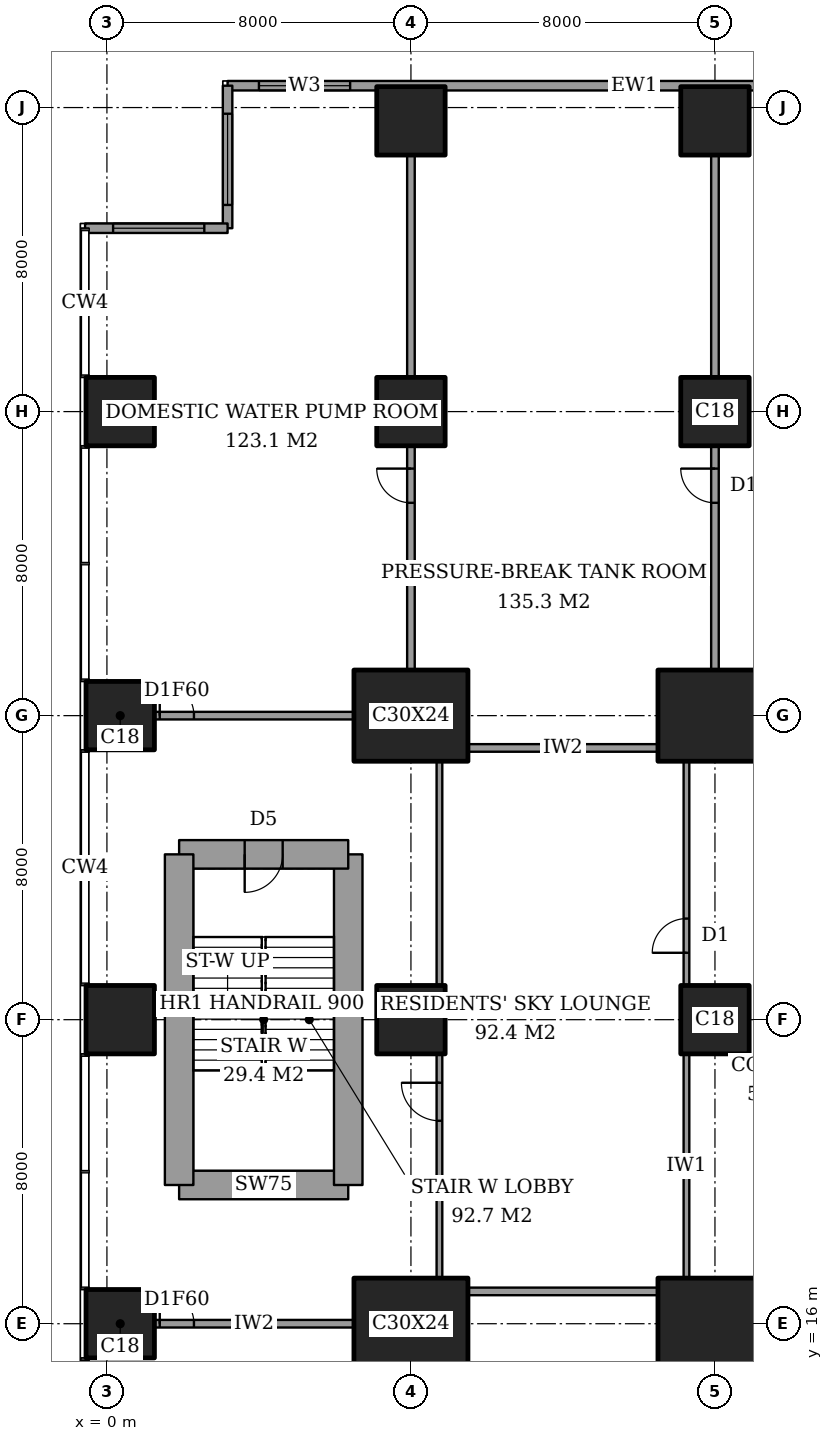
"""IFC4 building model, lengths in metres.
Left out: names, types, materials, properties, quantities, classifications, styles, units other than length and angle.
Written with IfcOpenShell. Run it as: python <this file> out.ifc"""

import sys

from ifc_helpers import new_model, si_unit, direction, frame, frame_2d, origin, origin_2d, place, context, subcontext, project, spatial, rectangle, extrude, element, fill, save


model = new_model("IFC4")
c1 = context("Model", 3, precision=1e-05, world=origin(), true_north=direction((0.0, 1.0)))
c2 = subcontext(c1, "Body", "Model", "MODEL_VIEW")
j1 = project(units=[si_unit("LENGTHUNIT", "METRE"), si_unit("PLANEANGLEUNIT", "RADIAN")], contexts=[c1])
p1 = place(None, origin())
s1 = spatial("IfcSite", under=j1, at=p1, CompositionType="ELEMENT")
p2 = place(p1, origin())
s2 = spatial("IfcBuilding", under=s1, at=p2, CompositionType="ELEMENT")
p3 = place(p2, frame((0.0, 0.0, 177.2)))
s3 = spatial("IfcBuildingStorey", under=s2, at=p3, CompositionType="ELEMENT", Elevation=177.2)
for number, where, z_axis, x_axis in (
    (1, (0.35, 16.0, 0.0), (0.0, 0.0, 1.0), (1.0, 0.0, 0.0)),
    (2, (0.35, 24.0, 0.0), (0.0, 0.0, 1.0), (1.0, 0.0, 0.0)),
    (3, (0.35, 32.0, 0.0), (0.0, 0.0, 1.0), (1.0, 0.0, 0.0)),
    (4, (0.35, 40.0, 0.0), (0.0, 0.0, 1.0), (1.0, 0.0, 0.0)),
):
    element("IfcColumn", number, at=place(p3, frame(where, z_axis=z_axis, x_axis=x_axis)), inside=s3, PredefinedType="COLUMN", context=c2, shape_type="SweptSolid", body=[
        extrude(rectangle(XDim=1.8, YDim=1.8, at=origin_2d()), origin(), (0.0, 0.0, 1.0), 5.0),
    ])
p4 = place(p3, frame((8.0, 16.0, 0.0), z_axis=(0.0, 0.0, 1.0), x_axis=(1.0, 0.0, 0.0)))
e5 = element("IfcColumn", 5, at=p4, inside=s3, PredefinedType="COLUMN", context=c2, shape_type="SweptSolid", body=[
    extrude(rectangle(XDim=3.0, YDim=2.4, at=origin_2d()), origin(), (0.0, 0.0, 1.0), 5.0),
])
p5 = place(p3, frame((8.0, 24.0, 0.0), z_axis=(0.0, 0.0, 1.0), x_axis=(1.0, 0.0, 0.0)))
e6 = element("IfcColumn", 6, at=p5, inside=s3, PredefinedType="COLUMN", context=c2, shape_type="SweptSolid", body=[
    extrude(rectangle(XDim=1.8, YDim=1.8, at=origin_2d()), origin(), (0.0, 0.0, 1.0), 5.0),
])
p6 = place(p3, frame((8.0, 32.0, 0.0), z_axis=(0.0, 0.0, 1.0), x_axis=(1.0, 0.0, 0.0)))
e7 = element("IfcColumn", 7, at=p6, inside=s3, PredefinedType="COLUMN", context=c2, shape_type="SweptSolid", body=[
    extrude(rectangle(XDim=3.0, YDim=2.4, at=origin_2d()), origin(), (0.0, 0.0, 1.0), 5.0),
])
for number, where, z_axis, x_axis in (
    (8, (8.0, 40.0, 0.0), (0.0, 0.0, 1.0), (1.0, 0.0, 0.0)),
    (9, (8.0, 47.65, 0.0), (0.0, 0.0, 1.0), (1.0, 0.0, 0.0)),
):
    element("IfcColumn", number, at=place(p3, frame(where, z_axis=z_axis, x_axis=x_axis)), inside=s3, PredefinedType="COLUMN", context=c2, shape_type="SweptSolid", body=[
        extrude(rectangle(XDim=1.8, YDim=1.8, at=origin_2d()), origin(), (0.0, 0.0, 1.0), 5.0),
    ])
p7 = place(p3, frame((16.0, 16.0, 0.0), z_axis=(0.0, 0.0, 1.0), x_axis=(1.0, 0.0, 0.0)))
e10 = element("IfcColumn", 10, at=p7, inside=s3, PredefinedType="COLUMN", context=c2, shape_type="SweptSolid", body=[
    extrude(rectangle(XDim=3.0, YDim=2.4, at=origin_2d()), origin(), (0.0, 0.0, 1.0), 5.0),
])
p8 = place(p3, frame((16.0, 24.0, 0.0), z_axis=(0.0, 0.0, 1.0), x_axis=(1.0, 0.0, 0.0)))
e11 = element("IfcColumn", 11, at=p8, inside=s3, PredefinedType="COLUMN", context=c2, shape_type="SweptSolid", body=[
    extrude(rectangle(XDim=1.8, YDim=1.8, at=origin_2d()), origin(), (0.0, 0.0, 1.0), 5.0),
])
p9 = place(p3, frame((16.0, 32.0, 0.0), z_axis=(0.0, 0.0, 1.0), x_axis=(1.0, 0.0, 0.0)))
e12 = element("IfcColumn", 12, at=p9, inside=s3, PredefinedType="COLUMN", context=c2, shape_type="SweptSolid", body=[
    extrude(rectangle(XDim=3.0, YDim=2.4, at=origin_2d()), origin(), (0.0, 0.0, 1.0), 5.0),
])
for number, where, z_axis, x_axis in (
    (13, (16.0, 40.0, 0.0), (0.0, 0.0, 1.0), (1.0, 0.0, 0.0)),
    (14, (16.0, 47.65, 0.0), (0.0, 0.0, 1.0), (1.0, 0.0, 0.0)),
):
    element("IfcColumn", number, at=place(p3, frame(where, z_axis=z_axis, x_axis=x_axis)), inside=s3, PredefinedType="COLUMN", context=c2, shape_type="SweptSolid", body=[
        extrude(rectangle(XDim=1.8, YDim=1.8, at=origin_2d()), origin(), (0.0, 0.0, 1.0), 5.0),
    ])
p10 = place(p3, frame((1.9, 19.65, 0.0), z_axis=(0.0, 0.0, 1.0), x_axis=(1.0, 0.0, 0.0)))
e15 = element("IfcWall", 15, at=p10, inside=s3, PredefinedType="SHEAR", context=c2, shape_type="SweptSolid", body=[
    extrude(rectangle(XDim=4.45, YDim=0.75, at=frame_2d((2.225, 0.0))), origin(), (0.0, 0.0, 1.0), 5.0),
])
p11 = place(p3, frame((6.35, 19.65, 0.0), z_axis=(0.0, 0.0, 1.0), x_axis=(0.0, 1.0, 0.0)))
e16 = element("IfcWall", 16, at=p11, inside=s3, PredefinedType="SHEAR", context=c2, shape_type="SweptSolid", body=[
    extrude(rectangle(XDim=8.7, YDim=0.75, at=frame_2d((4.35, 0.0))), origin(), (0.0, 0.0, 1.0), 5.0),
])
p12 = place(p3, frame((6.35, 28.35, 0.0), z_axis=(0.0, 0.0, 1.0), x_axis=(-1.0, 0.0, 0.0)))
e17 = element("IfcWall", 17, at=p12, inside=s3, PredefinedType="SHEAR", context=c2, shape_type="SweptSolid", body=[
    extrude(rectangle(XDim=4.45, YDim=0.75, at=frame_2d((2.225, 0.0))), origin(), (0.0, 0.0, 1.0), 5.0),
])
p13 = place(p12, frame((1.725, 0.0, 0.0)))
e18 = element("IfcOpeningElement", 18, at=p13, cuts=e17, PredefinedType="OPENING", context=c2, shape_type="SweptSolid", body=[
    extrude(rectangle(XDim=1.0, YDim=2.1, at=frame_2d((0.5, 1.05))), frame((0.0, 0.385, 0.0), z_axis=(0.0, -1.0, 0.0), x_axis=(1.0, 0.0, 0.0)), (0.0, 0.0, 1.0), 0.77),
])
p14 = place(p3, frame((1.9, 28.35, 0.0), z_axis=(0.0, 0.0, 1.0), x_axis=(0.0, -1.0, 0.0)))
e19 = element("IfcWall", 19, at=p14, inside=s3, PredefinedType="SHEAR", context=c2, shape_type="SweptSolid", body=[
    extrude(rectangle(XDim=8.7, YDim=0.75, at=frame_2d((4.35, 0.0))), origin(), (0.0, 0.0, 1.0), 5.0),
])
p15 = place(p3, frame((24.575, 48.575, 0.0), z_axis=(0.0, 0.0, 1.0), x_axis=(-1.0, 0.0, 0.0)))
e20 = element("IfcWall", 20, at=p15, inside=s3, PredefinedType="SOLIDWALL", context=c2, shape_type="SweptSolid", body=[
    extrude(rectangle(XDim=21.4, YDim=0.25, at=frame_2d((10.7, 0.0))), origin(), (0.0, 0.0, 1.0), 5.0),
])
p16 = place(p15, frame((18.175, 0.0, 0.6)))
e21 = element("IfcOpeningElement", 21, at=p16, cuts=e20, PredefinedType="OPENING", context=c2, shape_type="SweptSolid", body=[
    extrude(rectangle(XDim=2.4, YDim=3.0, at=frame_2d((1.2, 1.5))), frame((0.0, 0.135, 0.0), z_axis=(0.0, -1.0, 0.0), x_axis=(1.0, 0.0, 0.0)), (0.0, 0.0, 1.0), 0.27),
])
p17 = place(p3, frame((3.175, 48.575, 0.0), z_axis=(0.0, 0.0, 1.0), x_axis=(0.0, -1.0, 0.0)))
e22 = element("IfcWall", 22, at=p17, inside=s3, PredefinedType="SOLIDWALL", context=c2, shape_type="SweptSolid", body=[
    extrude(rectangle(XDim=3.75, YDim=0.25, at=frame_2d((1.875, 0.0))), origin(), (0.0, 0.0, 1.0), 5.0),
])
p18 = place(p17, frame((0.738, 0.0, 0.6)))
e23 = element("IfcOpeningElement", 23, at=p18, cuts=e22, PredefinedType="OPENING", context=c2, shape_type="SweptSolid", body=[
    extrude(rectangle(XDim=2.4, YDim=3.0, at=frame_2d((1.2, 1.5))), frame((0.0, 0.135, 0.0), z_axis=(0.0, -1.0, 0.0), x_axis=(1.0, 0.0, 0.0)), (0.0, 0.0, 1.0), 0.27),
])
p19 = place(p3, frame((3.175, 44.825, 0.0), z_axis=(0.0, 0.0, 1.0), x_axis=(-1.0, 0.0, 0.0)))
e24 = element("IfcWall", 24, at=p19, inside=s3, PredefinedType="SOLIDWALL", context=c2, shape_type="SweptSolid", body=[
    extrude(rectangle(XDim=3.75, YDim=0.25, at=frame_2d((1.875, 0.0))), origin(), (0.0, 0.0, 1.0), 5.0),
])
p20 = place(p19, frame((0.613, 0.0, 0.6)))
e25 = element("IfcOpeningElement", 25, at=p20, cuts=e24, PredefinedType="OPENING", context=c2, shape_type="SweptSolid", body=[
    extrude(rectangle(XDim=2.4, YDim=3.0, at=frame_2d((1.2, 1.5))), frame((0.0, 0.135, 0.0), z_axis=(0.0, -1.0, 0.0), x_axis=(1.0, 0.0, 0.0)), (0.0, 0.0, 1.0), 0.27),
])
p21 = place(p3, frame((1.25, 16.0, 0.0), z_axis=(0.0, 0.0, 1.0), x_axis=(1.0, 0.0, 0.0)))
e26 = element("IfcWall", 26, at=p21, inside=s3, PredefinedType="PARTITIONING", context=c2, shape_type="SweptSolid", body=[
    extrude(rectangle(XDim=5.25, YDim=0.2, at=frame_2d((2.625, 0.0))), origin(), (0.0, 0.0, 1.0), 4.75),
])
p22 = place(p21, frame((0.14, 0.0, 0.0)))
e27 = element("IfcOpeningElement", 27, at=p22, cuts=e26, PredefinedType="OPENING", context=c2, shape_type="SweptSolid", body=[
    extrude(rectangle(XDim=0.9, YDim=2.1, at=frame_2d((0.45, 1.05))), frame((0.0, 0.11, 0.0), z_axis=(0.0, -1.0, 0.0), x_axis=(1.0, 0.0, 0.0)), (0.0, 0.0, 1.0), 0.22),
])
for number, where, z_axis, x_axis in (
    (28, (9.5, 16.85, 0.0), (0.0, 0.0, 1.0), (1.0, 0.0, 0.0)),
    (29, (9.5, 31.15, 0.0), (0.0, 0.0, 1.0), (1.0, 0.0, 0.0)),
):
    element("IfcWall", number, at=place(p3, frame(where, z_axis=z_axis, x_axis=x_axis)), inside=s3, PredefinedType="PARTITIONING", context=c2, shape_type="SweptSolid", body=[
        extrude(rectangle(XDim=5.0, YDim=0.2, at=frame_2d((2.5, 0.0))), origin(), (0.0, 0.0, 1.0), 4.75),
    ])
p23 = place(p3, frame((1.25, 32.0, 0.0), z_axis=(0.0, 0.0, 1.0), x_axis=(1.0, 0.0, 0.0)))
e30 = element("IfcWall", 30, at=p23, inside=s3, PredefinedType="PARTITIONING", context=c2, shape_type="SweptSolid", body=[
    extrude(rectangle(XDim=5.25, YDim=0.2, at=frame_2d((2.625, 0.0))), origin(), (0.0, 0.0, 1.0), 4.75),
])
p24 = place(p23, frame((0.14, 0.0, 0.0)))
e31 = element("IfcOpeningElement", 31, at=p24, cuts=e30, PredefinedType="OPENING", context=c2, shape_type="SweptSolid", body=[
    extrude(rectangle(XDim=0.9, YDim=2.1, at=frame_2d((0.45, 1.05))), frame((0.0, 0.11, 0.0), z_axis=(0.0, -1.0, 0.0), x_axis=(1.0, 0.0, 0.0)), (0.0, 0.0, 1.0), 0.22),
])
p25 = place(p3, frame((8.0, 33.2, 0.0), z_axis=(0.0, 0.0, 1.0), x_axis=(0.0, 1.0, 0.0)))
e32 = element("IfcWall", 32, at=p25, inside=s3, PredefinedType="PARTITIONING", context=c2, shape_type="SweptSolid", body=[
    extrude(rectangle(XDim=5.9, YDim=0.2, at=frame_2d((2.95, 0.0))), origin(), (0.0, 0.0, 1.0), 4.75),
])
p26 = place(p25, frame((4.4, 0.0, 0.0)))
e33 = element("IfcOpeningElement", 33, at=p26, cuts=e32, PredefinedType="OPENING", context=c2, shape_type="SweptSolid", body=[
    extrude(rectangle(XDim=0.9, YDim=2.1, at=frame_2d((0.45, 1.05))), frame((0.0, 0.11, 0.0), z_axis=(0.0, -1.0, 0.0), x_axis=(1.0, 0.0, 0.0)), (0.0, 0.0, 1.0), 0.22),
])
p27 = place(p3, frame((8.0, 40.9, 0.0), z_axis=(0.0, 0.0, 1.0), x_axis=(0.0, 1.0, 0.0)))
e34 = element("IfcWall", 34, at=p27, inside=s3, PredefinedType="PARTITIONING", context=c2, shape_type="SweptSolid", body=[
    extrude(rectangle(XDim=5.85, YDim=0.2, at=frame_2d((2.925, 0.0))), origin(), (0.0, 0.0, 1.0), 4.75),
])
p28 = place(p3, frame((8.75, 17.2, 0.0), z_axis=(0.0, 0.0, 1.0), x_axis=(0.0, 1.0, 0.0)))
e35 = element("IfcWall", 35, at=p28, inside=s3, PredefinedType="PARTITIONING", context=c2, shape_type="SweptSolid", body=[
    extrude(rectangle(XDim=5.9, YDim=0.15, at=frame_2d((2.95, 0.0))), origin(), (0.0, 0.0, 1.0), 4.75),
])
p29 = place(p28, frame((4.14, 0.0, 0.0)))
e36 = element("IfcOpeningElement", 36, at=p29, cuts=e35, PredefinedType="OPENING", context=c2, shape_type="SweptSolid", body=[
    extrude(rectangle(XDim=1.0, YDim=2.1, at=frame_2d((0.5, 1.05))), frame((0.0, 0.085, 0.0), z_axis=(0.0, -1.0, 0.0), x_axis=(1.0, 0.0, 0.0)), (0.0, 0.0, 1.0), 0.17),
])
for number, where, z_axis, x_axis in (
    (37, (8.75, 24.9, 0.0), (0.0, 0.0, 1.0), (0.0, 1.0, 0.0)),
    (38, (15.25, 17.2, 0.0), (0.0, 0.0, 1.0), (0.0, 1.0, 0.0)),
):
    element("IfcWall", number, at=place(p3, frame(where, z_axis=z_axis, x_axis=x_axis)), inside=s3, PredefinedType="PARTITIONING", context=c2, shape_type="SweptSolid", body=[
        extrude(rectangle(XDim=5.9, YDim=0.15, at=frame_2d((2.95, 0.0))), origin(), (0.0, 0.0, 1.0), 4.75),
    ])
p30 = place(p3, frame((15.25, 24.9, 0.0), z_axis=(0.0, 0.0, 1.0), x_axis=(0.0, 1.0, 0.0)))
e39 = element("IfcWall", 39, at=p30, inside=s3, PredefinedType="PARTITIONING", context=c2, shape_type="SweptSolid", body=[
    extrude(rectangle(XDim=5.9, YDim=0.15, at=frame_2d((2.95, 0.0))), origin(), (0.0, 0.0, 1.0), 4.75),
])
p31 = place(p30, frame((0.86, 0.0, 0.0)))
e40 = element("IfcOpeningElement", 40, at=p31, cuts=e39, PredefinedType="OPENING", context=c2, shape_type="SweptSolid", body=[
    extrude(rectangle(XDim=0.9, YDim=2.1, at=frame_2d((0.45, 1.05))), frame((0.0, 0.085, 0.0), z_axis=(0.0, -1.0, 0.0), x_axis=(1.0, 0.0, 0.0)), (0.0, 0.0, 1.0), 0.17),
])
p32 = place(p3, frame((16.0, 33.2, 0.0), z_axis=(0.0, 0.0, 1.0), x_axis=(0.0, 1.0, 0.0)))
e41 = element("IfcWall", 41, at=p32, inside=s3, PredefinedType="PARTITIONING", context=c2, shape_type="SweptSolid", body=[
    extrude(rectangle(XDim=5.9, YDim=0.2, at=frame_2d((2.95, 0.0))), origin(), (0.0, 0.0, 1.0), 4.75),
])
p33 = place(p32, frame((4.4, 0.0, 0.0)))
e42 = element("IfcOpeningElement", 42, at=p33, cuts=e41, PredefinedType="OPENING", context=c2, shape_type="SweptSolid", body=[
    extrude(rectangle(XDim=0.9, YDim=2.1, at=frame_2d((0.45, 1.05))), frame((0.0, 0.11, 0.0), z_axis=(0.0, -1.0, 0.0), x_axis=(1.0, 0.0, 0.0)), (0.0, 0.0, 1.0), 0.22),
])
p34 = place(p3, frame((16.0, 40.9, 0.0), z_axis=(0.0, 0.0, 1.0), x_axis=(0.0, 1.0, 0.0)))
e43 = element("IfcWall", 43, at=p34, inside=s3, PredefinedType="PARTITIONING", context=c2, shape_type="SweptSolid", body=[
    extrude(rectangle(XDim=5.85, YDim=0.2, at=frame_2d((2.925, 0.0))), origin(), (0.0, 0.0, 1.0), 4.75),
])
p35 = place(p16, origin())
e44 = element("IfcWindow", 44, at=p35, inside=s3, PartitioningType="SINGLE_PANEL", PredefinedType="WINDOW", context=c2, shape_type="SweptSolid", body=[
    extrude(rectangle(XDim=2.4, YDim=3.0, at=frame_2d((1.2, 1.5))), frame((0.0, 0.03, 0.0), z_axis=(0.0, -1.0, 0.0), x_axis=(1.0, 0.0, 0.0)), (0.0, 0.0, 1.0), 0.06),
])
fill(e21, e44)
p36 = place(p18, origin())
e45 = element("IfcWindow", 45, at=p36, inside=s3, PartitioningType="SINGLE_PANEL", PredefinedType="WINDOW", context=c2, shape_type="SweptSolid", body=[
    extrude(rectangle(XDim=2.4, YDim=3.0, at=frame_2d((1.2, 1.5))), frame((0.0, 0.03, 0.0), z_axis=(0.0, -1.0, 0.0), x_axis=(1.0, 0.0, 0.0)), (0.0, 0.0, 1.0), 0.06),
])
fill(e23, e45)
p37 = place(p20, origin())
e46 = element("IfcWindow", 46, at=p37, inside=s3, PartitioningType="SINGLE_PANEL", PredefinedType="WINDOW", context=c2, shape_type="SweptSolid", body=[
    extrude(rectangle(XDim=2.4, YDim=3.0, at=frame_2d((1.2, 1.5))), frame((0.0, 0.03, 0.0), z_axis=(0.0, -1.0, 0.0), x_axis=(1.0, 0.0, 0.0)), (0.0, 0.0, 1.0), 0.06),
])
fill(e25, e46)
p38 = place(p29, origin())
e47 = element("IfcDoor", 47, at=p38, inside=s3, OperationType="SINGLE_SWING_LEFT", PredefinedType="DOOR", context=c2, shape_type="SweptSolid", body=[
    extrude(rectangle(XDim=1.0, YDim=2.1, at=frame_2d((0.5, 1.05))), frame((0.0, 0.025, 0.0), z_axis=(0.0, -1.0, 0.0), x_axis=(1.0, 0.0, 0.0)), (0.0, 0.0, 1.0), 0.05),
])
fill(e36, e47)
p39 = place(p31, origin())
e48 = element("IfcDoor", 48, at=p39, inside=s3, OperationType="SINGLE_SWING_RIGHT", PredefinedType="DOOR", context=c2, shape_type="SweptSolid", body=[
    extrude(rectangle(XDim=0.9, YDim=2.1, at=frame_2d((0.45, 1.05))), frame((0.0, 0.025, 0.0), z_axis=(0.0, -1.0, 0.0), x_axis=(1.0, 0.0, 0.0)), (0.0, 0.0, 1.0), 0.05),
])
fill(e40, e48)
p40 = place(p22, origin())
e49 = element("IfcDoor", 49, at=p40, inside=s3, OperationType="SINGLE_SWING_RIGHT", PredefinedType="DOOR", context=c2, shape_type="SweptSolid", body=[
    extrude(rectangle(XDim=0.9, YDim=2.1, at=frame_2d((0.45, 1.05))), frame((0.0, 0.025, 0.0), z_axis=(0.0, -1.0, 0.0), x_axis=(1.0, 0.0, 0.0)), (0.0, 0.0, 1.0), 0.05),
])
fill(e27, e49)
p41 = place(p24, origin())
e50 = element("IfcDoor", 50, at=p41, inside=s3, OperationType="SINGLE_SWING_RIGHT", PredefinedType="DOOR", context=c2, shape_type="SweptSolid", body=[
    extrude(rectangle(XDim=0.9, YDim=2.1, at=frame_2d((0.45, 1.05))), frame((0.0, 0.025, 0.0), z_axis=(0.0, -1.0, 0.0), x_axis=(1.0, 0.0, 0.0)), (0.0, 0.0, 1.0), 0.05),
])
fill(e31, e50)
p42 = place(p26, origin())
e51 = element("IfcDoor", 51, at=p42, inside=s3, OperationType="SINGLE_SWING_LEFT", PredefinedType="DOOR", context=c2, shape_type="SweptSolid", body=[
    extrude(rectangle(XDim=0.9, YDim=2.1, at=frame_2d((0.45, 1.05))), frame((0.0, 0.025, 0.0), z_axis=(0.0, -1.0, 0.0), x_axis=(1.0, 0.0, 0.0)), (0.0, 0.0, 1.0), 0.05),
])
fill(e33, e51)
p43 = place(p33, origin())
e52 = element("IfcDoor", 52, at=p43, inside=s3, OperationType="SINGLE_SWING_LEFT", PredefinedType="DOOR", context=c2, shape_type="SweptSolid", body=[
    extrude(rectangle(XDim=0.9, YDim=2.1, at=frame_2d((0.45, 1.05))), frame((0.0, 0.025, 0.0), z_axis=(0.0, -1.0, 0.0), x_axis=(1.0, 0.0, 0.0)), (0.0, 0.0, 1.0), 0.05),
])
fill(e42, e52)
p44 = place(p13, origin())
e53 = element("IfcDoor", 53, at=p44, inside=s3, OperationType="SINGLE_SWING_LEFT", PredefinedType="DOOR", context=c2, shape_type="SweptSolid", body=[
    extrude(rectangle(XDim=1.0, YDim=2.1, at=frame_2d((0.5, 1.05))), frame((0.0, 0.025, 0.0), z_axis=(0.0, -1.0, 0.0), x_axis=(1.0, 0.0, 0.0)), (0.0, 0.0, 1.0), 0.05),
])
fill(e18, e53)
save(model, sys.argv[1])
